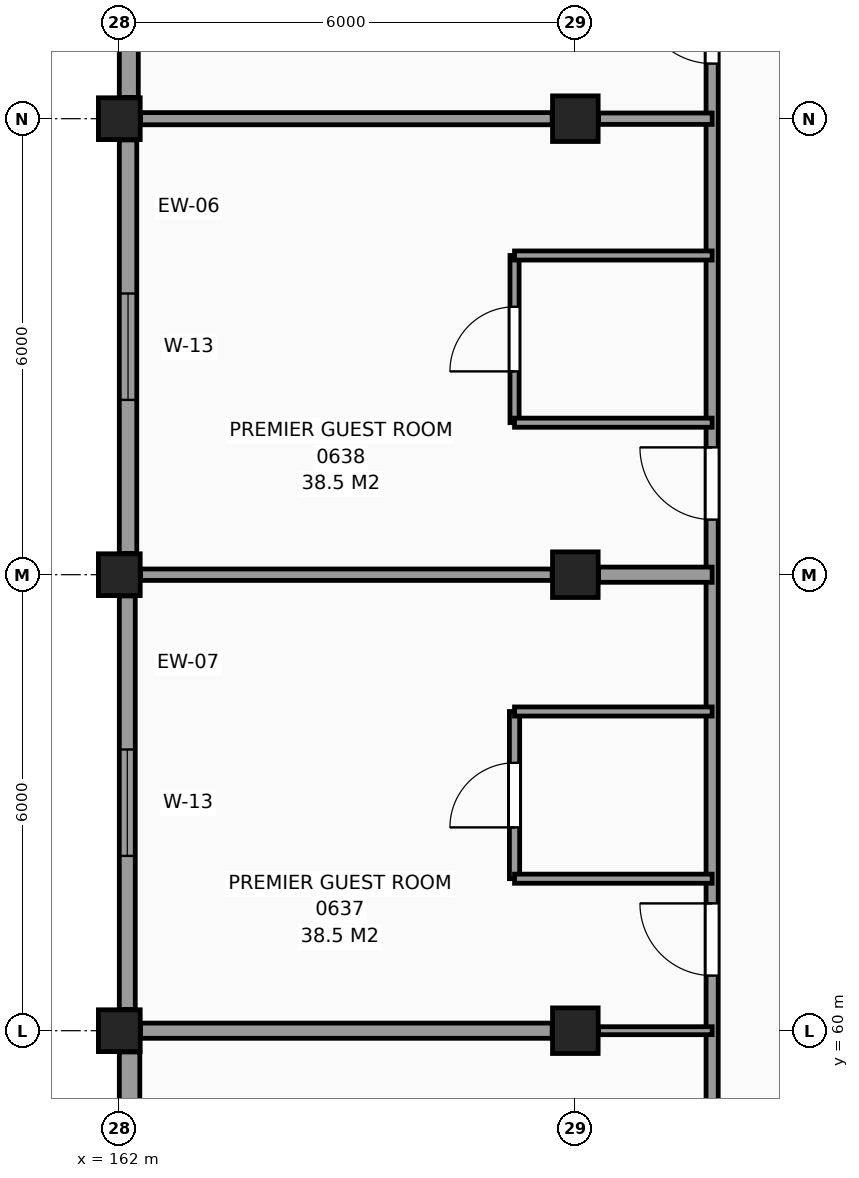
"""IFC4 building model, lengths in metres.
Left out: names, types, materials, properties, quantities, classifications, styles, units other than length and angle.
Written with IfcOpenShell. Run it as: python <this file> out.ifc"""

import sys

from ifc_helpers import new_model, si_unit, direction, frame, frame_2d, origin, origin_2d, place, context, subcontext, project, spatial, rectangle, extrude, element, fill, save


model = new_model("IFC4")
c1 = context("Model", 3, precision=1e-05, world=origin(), true_north=direction((0.0, 1.0)))
c2 = subcontext(c1, "Body", "Model", "MODEL_VIEW")
j1 = project(units=[si_unit("LENGTHUNIT", "METRE"), si_unit("PLANEANGLEUNIT", "RADIAN")], contexts=[c1])
p1 = place(None, origin())
s1 = spatial("IfcSite", under=j1, at=p1, CompositionType="ELEMENT")
p2 = place(p1, origin())
s2 = spatial("IfcBuilding", under=s1, at=p2, CompositionType="ELEMENT")
p3 = place(p2, frame((0.0, 0.0, 28.2)))
s3 = spatial("IfcBuildingStorey", under=s2, at=p3, CompositionType="ELEMENT", Elevation=28.2)
for number, where, z_axis, x_axis in (
    (1, (162.0, 60.0, 0.0), (0.0, 0.0, 1.0), (1.0, 0.0, 0.0)),
    (2, (162.0, 66.0, 0.0), (0.0, 0.0, 1.0), (1.0, 0.0, 0.0)),
    (3, (162.0, 72.0, 0.0), (0.0, 0.0, 1.0), (1.0, 0.0, 0.0)),
):
    element("IfcColumn", number, at=place(p3, frame(where, z_axis=z_axis, x_axis=x_axis)), inside=s3, PredefinedType="COLUMN", context=c2, shape_type="SweptSolid", body=[
        extrude(rectangle(XDim=0.55, YDim=0.55, at=origin_2d()), origin(), (0.0, 0.0, 1.0), 3.3),
    ])
for number, where, z_axis, x_axis in (
    (4, (168.0, 60.0, 0.0), (0.0, 0.0, 1.0), (1.0, 0.0, 0.0)),
    (5, (168.0, 66.0, 0.0), (0.0, 0.0, 1.0), (1.0, 0.0, 0.0)),
    (6, (168.0, 72.0, 0.0), (0.0, 0.0, 1.0), (1.0, 0.0, 0.0)),
):
    element("IfcColumn", number, at=place(p3, frame(where, z_axis=z_axis, x_axis=x_axis)), inside=s3, PredefinedType="COLUMN", context=c2, shape_type="SweptSolid", body=[
        extrude(rectangle(XDim=0.6, YDim=0.6, at=origin_2d()), origin(), (0.0, 0.0, 1.0), 3.3),
    ])
p4 = place(p3, frame((162.125, 77.72, 0.0), z_axis=(0.0, 0.0, 1.0), x_axis=(0.0, -1.0, 0.0)))
e7 = element("IfcWall", 7, at=p4, inside=s3, PredefinedType="SOLIDWALL", context=c2, shape_type="SweptSolid", body=[
    extrude(rectangle(XDim=5.44, YDim=0.25, at=frame_2d((2.72, 0.0))), origin(), (0.0, 0.0, 1.0), 2.43),
])
p5 = place(p4, frame((2.02, 0.0, 0.8)))
e8 = element("IfcOpeningElement", 8, at=p5, cuts=e7, PredefinedType="OPENING", context=c2, shape_type="SweptSolid", body=[
    extrude(rectangle(XDim=1.4, YDim=1.4, at=frame_2d((0.7, 0.7))), frame((0.0, 0.135, 0.0), z_axis=(0.0, -1.0, 0.0), x_axis=(1.0, 0.0, 0.0)), (0.0, 0.0, 1.0), 0.27),
])
p6 = place(p3, frame((162.115, 71.72, 0.0), z_axis=(0.0, 0.0, 1.0), x_axis=(0.0, -1.0, 0.0)))
e9 = element("IfcWall", 9, at=p6, inside=s3, PredefinedType="SOLIDWALL", context=c2, shape_type="SweptSolid", body=[
    extrude(rectangle(XDim=5.44, YDim=0.23, at=frame_2d((2.72, 0.0))), origin(), (0.0, 0.0, 1.0), 2.43),
])
p7 = place(p6, frame((2.02, 0.0, 0.8)))
e10 = element("IfcOpeningElement", 10, at=p7, cuts=e9, PredefinedType="OPENING", context=c2, shape_type="SweptSolid", body=[
    extrude(rectangle(XDim=1.4, YDim=1.4, at=frame_2d((0.7, 0.7))), frame((0.0, 0.125, 0.0), z_axis=(0.0, -1.0, 0.0), x_axis=(1.0, 0.0, 0.0)), (0.0, 0.0, 1.0), 0.25),
])
p8 = place(p3, frame((162.105, 65.72, 0.0), z_axis=(0.0, 0.0, 1.0), x_axis=(0.0, -1.0, 0.0)))
e11 = element("IfcWall", 11, at=p8, inside=s3, PredefinedType="SOLIDWALL", context=c2, shape_type="SweptSolid", body=[
    extrude(rectangle(XDim=5.44, YDim=0.21, at=frame_2d((2.72, 0.0))), origin(), (0.0, 0.0, 1.0), 2.43),
])
p9 = place(p8, frame((2.02, 0.0, 0.8)))
e12 = element("IfcOpeningElement", 12, at=p9, cuts=e11, PredefinedType="OPENING", context=c2, shape_type="SweptSolid", body=[
    extrude(rectangle(XDim=1.4, YDim=1.4, at=frame_2d((0.7, 0.7))), frame((0.0, 0.115, 0.0), z_axis=(0.0, -1.0, 0.0), x_axis=(1.0, 0.0, 0.0)), (0.0, 0.0, 1.0), 0.23),
])
p10 = place(p3, frame((162.135, 59.72, 0.0), z_axis=(0.0, 0.0, 1.0), x_axis=(0.0, -1.0, 0.0)))
e13 = element("IfcWall", 13, at=p10, inside=s3, PredefinedType="SOLIDWALL", context=c2, shape_type="SweptSolid", body=[
    extrude(rectangle(XDim=5.44, YDim=0.27, at=frame_2d((2.72, 0.0))), origin(), (0.0, 0.0, 1.0), 2.43),
])
p11 = place(p10, frame((2.02, 0.0, 0.8)))
e14 = element("IfcOpeningElement", 14, at=p11, cuts=e13, PredefinedType="OPENING", context=c2, shape_type="SweptSolid", body=[
    extrude(rectangle(XDim=1.4, YDim=1.4, at=frame_2d((0.7, 0.7))), frame((0.0, 0.145, 0.0), z_axis=(0.0, -1.0, 0.0), x_axis=(1.0, 0.0, 0.0)), (0.0, 0.0, 1.0), 0.29),
])
p12 = place(p3, frame((167.2, 62.0, 0.0), z_axis=(0.0, 0.0, 1.0), x_axis=(0.0, 1.0, 0.0)))
e15 = element("IfcWall", 15, at=p12, inside=s3, PredefinedType="PARTITIONING", context=c2, shape_type="SweptSolid", body=[
    extrude(rectangle(XDim=2.2, YDim=0.135, at=frame_2d((1.1, 0.0))), origin(), (0.0, 0.0, 1.0), 3.08),
])
p13 = place(p12, frame((0.675, 0.0, 0.0)))
e16 = element("IfcOpeningElement", 16, at=p13, cuts=e15, PredefinedType="OPENING", context=c2, shape_type="SweptSolid", body=[
    extrude(rectangle(XDim=0.85, YDim=2.1, at=frame_2d((0.425, 1.05))), frame((0.0, 0.078, 0.0), z_axis=(0.0, -1.0, 0.0), x_axis=(1.0, 0.0, 0.0)), (0.0, 0.0, 1.0), 0.155),
])
p14 = place(p3, frame((167.2, 68.0, 0.0), z_axis=(0.0, 0.0, 1.0), x_axis=(0.0, 1.0, 0.0)))
e17 = element("IfcWall", 17, at=p14, inside=s3, PredefinedType="PARTITIONING", context=c2, shape_type="SweptSolid", body=[
    extrude(rectangle(XDim=2.2, YDim=0.12, at=frame_2d((1.1, 0.0))), origin(), (0.0, 0.0, 1.0), 3.08),
])
p15 = place(p14, frame((0.675, 0.0, 0.0)))
e18 = element("IfcOpeningElement", 18, at=p15, cuts=e17, PredefinedType="OPENING", context=c2, shape_type="SweptSolid", body=[
    extrude(rectangle(XDim=0.85, YDim=2.1, at=frame_2d((0.425, 1.05))), frame((0.0, 0.07, 0.0), z_axis=(0.0, -1.0, 0.0), x_axis=(1.0, 0.0, 0.0)), (0.0, 0.0, 1.0), 0.14),
])
p16 = place(p3, frame((169.8, 42.275, 0.0), z_axis=(0.0, 0.0, 1.0), x_axis=(0.0, 1.0, 0.0)))
e19 = element("IfcWall", 19, at=p16, inside=s3, PredefinedType="PARTITIONING", context=c2, shape_type="SweptSolid", body=[
    extrude(rectangle(XDim=65.545, YDim=0.16, at=frame_2d((32.772, 0.0))), origin(), (0.0, 0.0, 1.0), 3.08),
])
p17 = place(p16, frame((50.125, 0.0, 0.0)))
e20 = element("IfcOpeningElement", 20, at=p17, cuts=e19, PredefinedType="OPENING", context=c2, shape_type="SweptSolid", body=[
    extrude(rectangle(XDim=1.2, YDim=2.2, at=frame_2d((0.6, 1.1))), frame((0.0, 0.09, 0.0), z_axis=(0.0, -1.0, 0.0), x_axis=(1.0, 0.0, 0.0)), (0.0, 0.0, 1.0), 0.18),
])
p18 = place(p16, frame((0.4, 0.0, 0.0)))
e21 = element("IfcOpeningElement", 21, at=p18, cuts=e19, PredefinedType="OPENING", context=c2, shape_type="SweptSolid", body=[
    extrude(rectangle(XDim=0.95, YDim=2.1, at=frame_2d((0.475, 1.05))), frame((0.0, 0.09, 0.0), z_axis=(0.0, -1.0, 0.0), x_axis=(1.0, 0.0, 0.0)), (0.0, 0.0, 1.0), 0.18),
])
p19 = place(p16, frame((6.45, 0.0, 0.0)))
e22 = element("IfcOpeningElement", 22, at=p19, cuts=e19, PredefinedType="OPENING", context=c2, shape_type="SweptSolid", body=[
    extrude(rectangle(XDim=0.95, YDim=2.1, at=frame_2d((0.475, 1.05))), frame((0.0, 0.09, 0.0), z_axis=(0.0, -1.0, 0.0), x_axis=(1.0, 0.0, 0.0)), (0.0, 0.0, 1.0), 0.18),
])
p20 = place(p16, frame((12.45, 0.0, 0.0)))
e23 = element("IfcOpeningElement", 23, at=p20, cuts=e19, PredefinedType="OPENING", context=c2, shape_type="SweptSolid", body=[
    extrude(rectangle(XDim=0.95, YDim=2.1, at=frame_2d((0.475, 1.05))), frame((0.0, 0.09, 0.0), z_axis=(0.0, -1.0, 0.0), x_axis=(1.0, 0.0, 0.0)), (0.0, 0.0, 1.0), 0.18),
])
p21 = place(p16, frame((18.45, 0.0, 0.0)))
e24 = element("IfcOpeningElement", 24, at=p21, cuts=e19, PredefinedType="OPENING", context=c2, shape_type="SweptSolid", body=[
    extrude(rectangle(XDim=0.95, YDim=2.1, at=frame_2d((0.475, 1.05))), frame((0.0, 0.09, 0.0), z_axis=(0.0, -1.0, 0.0), x_axis=(1.0, 0.0, 0.0)), (0.0, 0.0, 1.0), 0.18),
])
p22 = place(p16, frame((24.45, 0.0, 0.0)))
e25 = element("IfcOpeningElement", 25, at=p22, cuts=e19, PredefinedType="OPENING", context=c2, shape_type="SweptSolid", body=[
    extrude(rectangle(XDim=0.95, YDim=2.1, at=frame_2d((0.475, 1.05))), frame((0.0, 0.09, 0.0), z_axis=(0.0, -1.0, 0.0), x_axis=(1.0, 0.0, 0.0)), (0.0, 0.0, 1.0), 0.18),
])
p23 = place(p16, frame((30.45, 0.0, 0.0)))
e26 = element("IfcOpeningElement", 26, at=p23, cuts=e19, PredefinedType="OPENING", context=c2, shape_type="SweptSolid", body=[
    extrude(rectangle(XDim=0.95, YDim=2.1, at=frame_2d((0.475, 1.05))), frame((0.0, 0.09, 0.0), z_axis=(0.0, -1.0, 0.0), x_axis=(1.0, 0.0, 0.0)), (0.0, 0.0, 1.0), 0.18),
])
p24 = place(p16, frame((54.45, 0.0, 0.0)))
e27 = element("IfcOpeningElement", 27, at=p24, cuts=e19, PredefinedType="OPENING", context=c2, shape_type="SweptSolid", body=[
    extrude(rectangle(XDim=0.95, YDim=2.1, at=frame_2d((0.475, 1.05))), frame((0.0, 0.09, 0.0), z_axis=(0.0, -1.0, 0.0), x_axis=(1.0, 0.0, 0.0)), (0.0, 0.0, 1.0), 0.18),
])
p25 = place(p16, frame((60.45, 0.0, 0.0)))
e28 = element("IfcOpeningElement", 28, at=p25, cuts=e19, PredefinedType="OPENING", context=c2, shape_type="SweptSolid", body=[
    extrude(rectangle(XDim=0.95, YDim=2.1, at=frame_2d((0.475, 1.05))), frame((0.0, 0.09, 0.0), z_axis=(0.0, -1.0, 0.0), x_axis=(1.0, 0.0, 0.0)), (0.0, 0.0, 1.0), 0.18),
])
p26 = place(p3, frame((162.28, 60.0, 0.0), z_axis=(0.0, 0.0, 1.0), x_axis=(1.0, 0.0, 0.0)))
e29 = element("IfcWall", 29, at=p26, inside=s3, PredefinedType="PARTITIONING", context=c2, shape_type="SweptSolid", body=[
    extrude(rectangle(XDim=5.415, YDim=0.2, at=frame_2d((2.708, 0.0))), origin(), (0.0, 0.0, 1.0), 2.28),
])
p27 = place(p3, frame((168.305, 60.0, 0.0), z_axis=(0.0, 0.0, 1.0), x_axis=(1.0, 0.0, 0.0)))
e30 = element("IfcWall", 30, at=p27, inside=s3, PredefinedType="PARTITIONING", context=c2, shape_type="SweptSolid", body=[
    extrude(rectangle(XDim=1.495, YDim=0.105, at=frame_2d((0.748, 0.0))), origin(), (0.0, 0.0, 1.0), 2.28),
])
for number, where, z_axis, x_axis in (
    (31, (167.2, 62.0, 0.0), (0.0, 0.0, 1.0), (1.0, 0.0, 0.0)),
    (32, (167.2, 64.2, 0.0), (0.0, 0.0, 1.0), (1.0, 0.0, 0.0)),
):
    element("IfcWall", number, at=place(p3, frame(where, z_axis=z_axis, x_axis=x_axis)), inside=s3, PredefinedType="PARTITIONING", context=c2, shape_type="SweptSolid", body=[
        extrude(rectangle(XDim=2.6, YDim=0.12, at=frame_2d((1.3, 0.0))), origin(), (0.0, 0.0, 1.0), 3.08),
    ])
p28 = place(p3, frame((162.28, 66.0, 0.0), z_axis=(0.0, 0.0, 1.0), x_axis=(1.0, 0.0, 0.0)))
e33 = element("IfcWall", 33, at=p28, inside=s3, PredefinedType="PARTITIONING", context=c2, shape_type="SweptSolid", body=[
    extrude(rectangle(XDim=5.415, YDim=0.15, at=frame_2d((2.708, 0.0))), origin(), (0.0, 0.0, 1.0), 2.28),
])
p29 = place(p3, frame((168.305, 66.0, 0.0), z_axis=(0.0, 0.0, 1.0), x_axis=(1.0, 0.0, 0.0)))
e34 = element("IfcWall", 34, at=p29, inside=s3, PredefinedType="PARTITIONING", context=c2, shape_type="SweptSolid", body=[
    extrude(rectangle(XDim=1.495, YDim=0.2, at=frame_2d((0.748, 0.0))), origin(), (0.0, 0.0, 1.0), 2.28),
])
for number, where, z_axis, x_axis in (
    (35, (167.2, 68.0, 0.0), (0.0, 0.0, 1.0), (1.0, 0.0, 0.0)),
    (36, (167.2, 70.2, 0.0), (0.0, 0.0, 1.0), (1.0, 0.0, 0.0)),
):
    element("IfcWall", number, at=place(p3, frame(where, z_axis=z_axis, x_axis=x_axis)), inside=s3, PredefinedType="PARTITIONING", context=c2, shape_type="SweptSolid", body=[
        extrude(rectangle(XDim=2.6, YDim=0.12, at=frame_2d((1.3, 0.0))), origin(), (0.0, 0.0, 1.0), 3.08),
    ])
p30 = place(p3, frame((162.28, 72.0, 0.0), z_axis=(0.0, 0.0, 1.0), x_axis=(1.0, 0.0, 0.0)))
e37 = element("IfcWall", 37, at=p30, inside=s3, PredefinedType="PARTITIONING", context=c2, shape_type="SweptSolid", body=[
    extrude(rectangle(XDim=5.415, YDim=0.16, at=frame_2d((2.708, 0.0))), origin(), (0.0, 0.0, 1.0), 2.28),
])
p31 = place(p3, frame((168.305, 72.0, 0.0), z_axis=(0.0, 0.0, 1.0), x_axis=(1.0, 0.0, 0.0)))
e38 = element("IfcWall", 38, at=p31, inside=s3, PredefinedType="PARTITIONING", context=c2, shape_type="SweptSolid", body=[
    extrude(rectangle(XDim=1.495, YDim=0.15, at=frame_2d((0.748, 0.0))), origin(), (0.0, 0.0, 1.0), 2.28),
])
p32 = place(p9, origin())
e39 = element("IfcWindow", 39, at=p32, inside=s3, PartitioningType="SINGLE_PANEL", PredefinedType="WINDOW", context=c2, shape_type="SweptSolid", body=[
    extrude(rectangle(XDim=1.4, YDim=1.4, at=frame_2d((0.7, 0.7))), frame((0.0, 0.03, 0.0), z_axis=(0.0, -1.0, 0.0), x_axis=(1.0, 0.0, 0.0)), (0.0, 0.0, 1.0), 0.06),
])
fill(e12, e39)
p33 = place(p7, origin())
e40 = element("IfcWindow", 40, at=p33, inside=s3, PartitioningType="SINGLE_PANEL", PredefinedType="WINDOW", context=c2, shape_type="SweptSolid", body=[
    extrude(rectangle(XDim=1.4, YDim=1.4, at=frame_2d((0.7, 0.7))), frame((0.0, 0.03, 0.0), z_axis=(0.0, -1.0, 0.0), x_axis=(1.0, 0.0, 0.0)), (0.0, 0.0, 1.0), 0.06),
])
fill(e10, e40)
p34 = place(p13, origin())
e41 = element("IfcDoor", 41, at=p34, inside=s3, OperationType="SINGLE_SWING_LEFT", PredefinedType="DOOR", context=c2, shape_type="SweptSolid", body=[
    extrude(rectangle(XDim=0.85, YDim=2.1, at=frame_2d((0.425, 1.05))), frame((0.0, 0.025, 0.0), z_axis=(0.0, -1.0, 0.0), x_axis=(1.0, 0.0, 0.0)), (0.0, 0.0, 1.0), 0.05),
])
fill(e16, e41)
p35 = place(p21, origin())
e42 = element("IfcDoor", 42, at=p35, inside=s3, OperationType="SINGLE_SWING_RIGHT", PredefinedType="DOOR", context=c2, shape_type="SweptSolid", body=[
    extrude(rectangle(XDim=0.95, YDim=2.1, at=frame_2d((0.475, 1.05))), frame((0.0, 0.025, 0.0), z_axis=(0.0, -1.0, 0.0), x_axis=(1.0, 0.0, 0.0)), (0.0, 0.0, 1.0), 0.05),
])
fill(e24, e42)
p36 = place(p15, origin())
e43 = element("IfcDoor", 43, at=p36, inside=s3, OperationType="SINGLE_SWING_LEFT", PredefinedType="DOOR", context=c2, shape_type="SweptSolid", body=[
    extrude(rectangle(XDim=0.85, YDim=2.1, at=frame_2d((0.425, 1.05))), frame((0.0, 0.025, 0.0), z_axis=(0.0, -1.0, 0.0), x_axis=(1.0, 0.0, 0.0)), (0.0, 0.0, 1.0), 0.05),
])
fill(e18, e43)
p37 = place(p22, origin())
e44 = element("IfcDoor", 44, at=p37, inside=s3, OperationType="SINGLE_SWING_RIGHT", PredefinedType="DOOR", context=c2, shape_type="SweptSolid", body=[
    extrude(rectangle(XDim=0.95, YDim=2.1, at=frame_2d((0.475, 1.05))), frame((0.0, 0.025, 0.0), z_axis=(0.0, -1.0, 0.0), x_axis=(1.0, 0.0, 0.0)), (0.0, 0.0, 1.0), 0.05),
])
fill(e25, e44)
p38 = place(p23, origin())
e45 = element("IfcDoor", 45, at=p38, inside=s3, OperationType="SINGLE_SWING_RIGHT", PredefinedType="DOOR", context=c2, shape_type="SweptSolid", body=[
    extrude(rectangle(XDim=0.95, YDim=2.1, at=frame_2d((0.475, 1.05))), frame((0.0, 0.025, 0.0), z_axis=(0.0, -1.0, 0.0), x_axis=(1.0, 0.0, 0.0)), (0.0, 0.0, 1.0), 0.05),
])
fill(e26, e45)
save(model, sys.argv[1])
